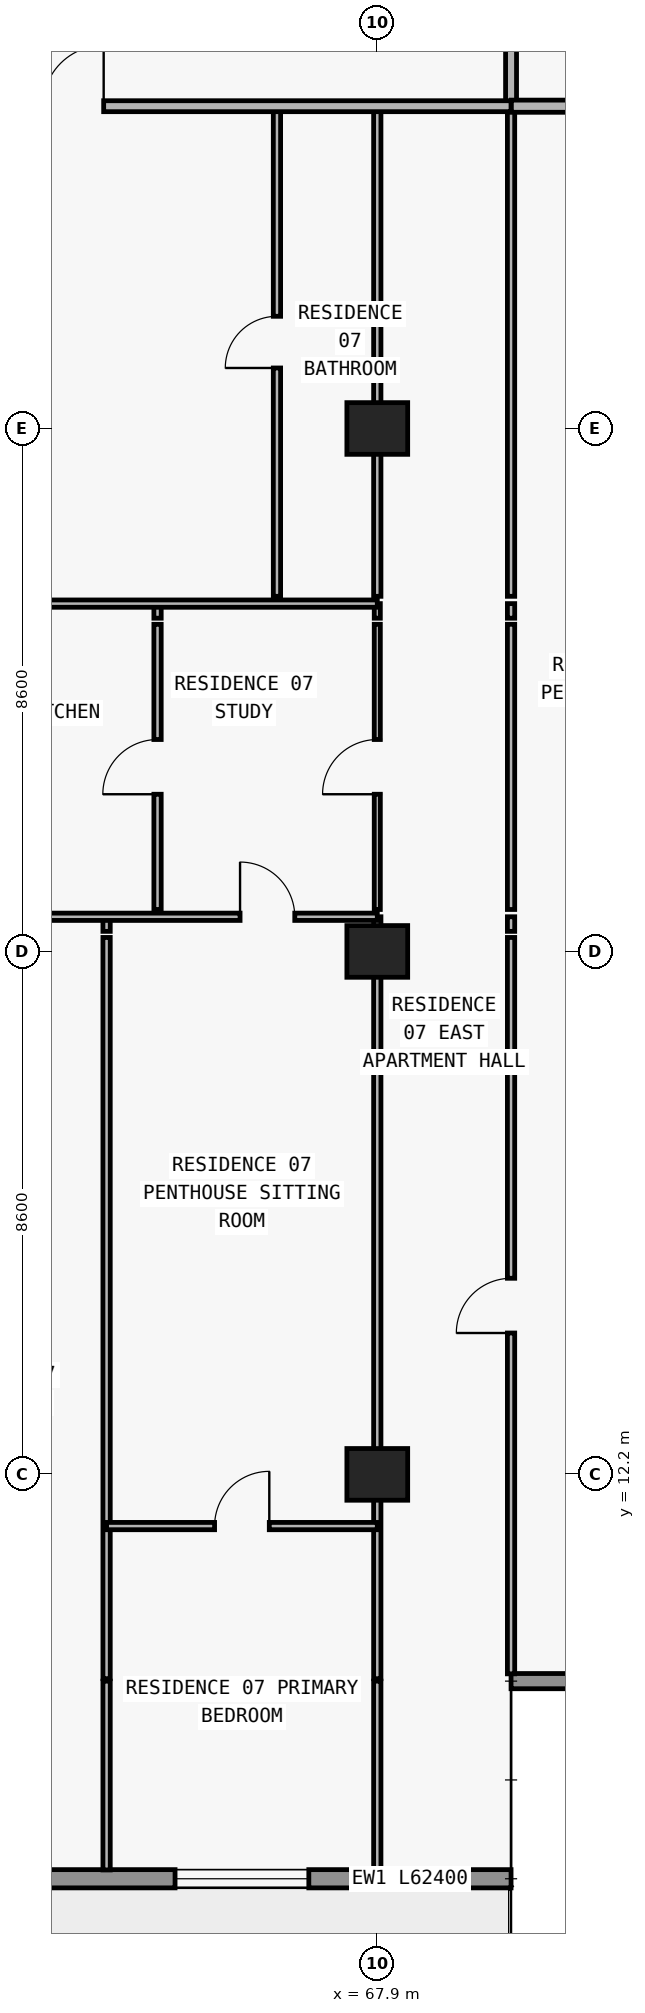
"""IFC4 building model, lengths in metres.
Left out: names, types, materials, properties, quantities, classifications, styles, units other than length and angle.
Written with IfcOpenShell. Run it as: python <this file> out.ifc"""

import sys

from ifc_helpers import new_model, si_unit, direction, frame, frame_2d, origin, origin_2d, place, context, subcontext, project, spatial, rectangle, extrude, element, fill, save


model = new_model("IFC4")
c1 = context("Model", 3, precision=1e-05, world=origin(), true_north=direction((0.0, 1.0)))
c2 = subcontext(c1, "Body", "Model", "MODEL_VIEW")
j1 = project(units=[si_unit("LENGTHUNIT", "METRE"), si_unit("PLANEANGLEUNIT", "RADIAN")], contexts=[c1])
p1 = place(None, origin())
s1 = spatial("IfcSite", under=j1, at=p1, CompositionType="ELEMENT")
p2 = place(p1, origin())
s2 = spatial("IfcBuilding", under=s1, at=p2, CompositionType="ELEMENT")
p3 = place(p2, frame((0.0, 0.0, 122.4)))
s3 = spatial("IfcBuildingStorey", under=s2, at=p3, CompositionType="ELEMENT", Elevation=122.4)
for number, where, z_axis, x_axis in (
    (1, (67.9, 12.2, 0.0), (0.0, 0.0, 1.0), (1.0, 0.0, 0.0)),
    (2, (67.9, 20.8, 0.0), (0.0, 0.0, 1.0), (1.0, 0.0, 0.0)),
    (3, (67.9, 29.4, 0.0), (0.0, 0.0, 1.0), (1.0, 0.0, 0.0)),
):
    element("IfcColumn", number, at=place(p3, frame(where, z_axis=z_axis, x_axis=x_axis)), inside=s3, PredefinedType="COLUMN", context=c2, shape_type="SweptSolid", body=[
        extrude(rectangle(XDim=1.0, YDim=0.85, at=origin_2d()), origin(), (0.0, 0.0, 1.0), 3.05),
    ])
p4 = place(p3, frame((70.1, 5.55, 0.0), z_axis=(0.0, 0.0, 1.0), x_axis=(-1.0, 0.0, 0.0)))
e4 = element("IfcWall", 4, at=p4, inside=s3, PredefinedType="STANDARD", context=c2, shape_type="SweptSolid", body=[
    extrude(rectangle(XDim=62.4, YDim=0.3, at=frame_2d((31.2, 0.0))), origin(), (0.0, 0.0, 1.0), 3.05),
])
p5 = place(p4, frame((57.226, 0.0, 0.0)))
e5 = element("IfcOpeningElement", 5, at=p5, cuts=e4, PredefinedType="OPENING", context=c2, shape_type="SweptSolid", body=[
    extrude(rectangle(XDim=2.0, YDim=2.3, at=frame_2d((1.0, 1.15))), frame((0.0, 0.16, 0.0), z_axis=(0.0, -1.0, 0.0), x_axis=(1.0, 0.0, 0.0)), (0.0, 0.0, 1.0), 0.32),
])
p6 = place(p4, frame((52.926, 0.0, 0.85)))
e6 = element("IfcOpeningElement", 6, at=p6, cuts=e4, PredefinedType="OPENING", context=c2, shape_type="SweptSolid", body=[
    extrude(rectangle(XDim=2.2, YDim=1.55, at=frame_2d((1.1, 0.775))), frame((0.0, 0.16, 0.0), z_axis=(0.0, -1.0, 0.0), x_axis=(1.0, 0.0, 0.0)), (0.0, 0.0, 1.0), 0.32),
])
p7 = place(p4, frame((48.49, 0.0, 0.0)))
e7 = element("IfcOpeningElement", 7, at=p7, cuts=e4, PredefinedType="OPENING", context=c2, shape_type="SweptSolid", body=[
    extrude(rectangle(XDim=2.0, YDim=2.3, at=frame_2d((1.0, 1.15))), frame((0.0, 0.16, 0.0), z_axis=(0.0, -1.0, 0.0), x_axis=(1.0, 0.0, 0.0)), (0.0, 0.0, 1.0), 0.32),
])
p8 = place(p4, frame((44.39, 0.0, 0.85)))
e8 = element("IfcOpeningElement", 8, at=p8, cuts=e4, PredefinedType="OPENING", context=c2, shape_type="SweptSolid", body=[
    extrude(rectangle(XDim=1.8, YDim=1.55, at=frame_2d((0.9, 0.775))), frame((0.0, 0.16, 0.0), z_axis=(0.0, -1.0, 0.0), x_axis=(1.0, 0.0, 0.0)), (0.0, 0.0, 1.0), 0.32),
])
p9 = place(p4, frame((40.426, 0.0, 0.0)))
e9 = element("IfcOpeningElement", 9, at=p9, cuts=e4, PredefinedType="OPENING", context=c2, shape_type="SweptSolid", body=[
    extrude(rectangle(XDim=2.0, YDim=2.3, at=frame_2d((1.0, 1.15))), frame((0.0, 0.16, 0.0), z_axis=(0.0, -1.0, 0.0), x_axis=(1.0, 0.0, 0.0)), (0.0, 0.0, 1.0), 0.32),
])
p10 = place(p4, frame((36.126, 0.0, 0.85)))
e10 = element("IfcOpeningElement", 10, at=p10, cuts=e4, PredefinedType="OPENING", context=c2, shape_type="SweptSolid", body=[
    extrude(rectangle(XDim=2.2, YDim=1.55, at=frame_2d((1.1, 0.775))), frame((0.0, 0.16, 0.0), z_axis=(0.0, -1.0, 0.0), x_axis=(1.0, 0.0, 0.0)), (0.0, 0.0, 1.0), 0.32),
])
p11 = place(p4, frame((31.91, 0.0, 0.0)))
e11 = element("IfcOpeningElement", 11, at=p11, cuts=e4, PredefinedType="OPENING", context=c2, shape_type="SweptSolid", body=[
    extrude(rectangle(XDim=2.0, YDim=2.3, at=frame_2d((1.0, 1.15))), frame((0.0, 0.16, 0.0), z_axis=(0.0, -1.0, 0.0), x_axis=(1.0, 0.0, 0.0)), (0.0, 0.0, 1.0), 0.32),
])
p12 = place(p4, frame((28.21, 0.0, 0.85)))
e12 = element("IfcOpeningElement", 12, at=p12, cuts=e4, PredefinedType="OPENING", context=c2, shape_type="SweptSolid", body=[
    extrude(rectangle(XDim=1.8, YDim=1.55, at=frame_2d((0.9, 0.775))), frame((0.0, 0.16, 0.0), z_axis=(0.0, -1.0, 0.0), x_axis=(1.0, 0.0, 0.0)), (0.0, 0.0, 1.0), 0.32),
])
p13 = place(p4, frame((24.426, 0.0, 0.0)))
e13 = element("IfcOpeningElement", 13, at=p13, cuts=e4, PredefinedType="OPENING", context=c2, shape_type="SweptSolid", body=[
    extrude(rectangle(XDim=2.0, YDim=2.3, at=frame_2d((1.0, 1.15))), frame((0.0, 0.16, 0.0), z_axis=(0.0, -1.0, 0.0), x_axis=(1.0, 0.0, 0.0)), (0.0, 0.0, 1.0), 0.32),
])
p14 = place(p4, frame((20.126, 0.0, 0.85)))
e14 = element("IfcOpeningElement", 14, at=p14, cuts=e4, PredefinedType="OPENING", context=c2, shape_type="SweptSolid", body=[
    extrude(rectangle(XDim=2.2, YDim=1.55, at=frame_2d((1.1, 0.775))), frame((0.0, 0.16, 0.0), z_axis=(0.0, -1.0, 0.0), x_axis=(1.0, 0.0, 0.0)), (0.0, 0.0, 1.0), 0.32),
])
p15 = place(p4, frame((15.69, 0.0, 0.0)))
e15 = element("IfcOpeningElement", 15, at=p15, cuts=e4, PredefinedType="OPENING", context=c2, shape_type="SweptSolid", body=[
    extrude(rectangle(XDim=2.0, YDim=2.3, at=frame_2d((1.0, 1.15))), frame((0.0, 0.16, 0.0), z_axis=(0.0, -1.0, 0.0), x_axis=(1.0, 0.0, 0.0)), (0.0, 0.0, 1.0), 0.32),
])
p16 = place(p4, frame((11.59, 0.0, 0.85)))
e16 = element("IfcOpeningElement", 16, at=p16, cuts=e4, PredefinedType="OPENING", context=c2, shape_type="SweptSolid", body=[
    extrude(rectangle(XDim=1.8, YDim=1.55, at=frame_2d((0.9, 0.775))), frame((0.0, 0.16, 0.0), z_axis=(0.0, -1.0, 0.0), x_axis=(1.0, 0.0, 0.0)), (0.0, 0.0, 1.0), 0.32),
])
p17 = place(p4, frame((7.626, 0.0, 0.0)))
e17 = element("IfcOpeningElement", 17, at=p17, cuts=e4, PredefinedType="OPENING", context=c2, shape_type="SweptSolid", body=[
    extrude(rectangle(XDim=2.0, YDim=2.3, at=frame_2d((1.0, 1.15))), frame((0.0, 0.16, 0.0), z_axis=(0.0, -1.0, 0.0), x_axis=(1.0, 0.0, 0.0)), (0.0, 0.0, 1.0), 0.32),
])
p18 = place(p4, frame((3.326, 0.0, 0.85)))
e18 = element("IfcOpeningElement", 18, at=p18, cuts=e4, PredefinedType="OPENING", context=c2, shape_type="SweptSolid", body=[
    extrude(rectangle(XDim=2.2, YDim=1.55, at=frame_2d((1.1, 0.775))), frame((0.0, 0.16, 0.0), z_axis=(0.0, -1.0, 0.0), x_axis=(1.0, 0.0, 0.0)), (0.0, 0.0, 1.0), 0.32),
])
p19 = place(p3, frame((70.1, 8.8, 0.0), z_axis=(0.0, 0.0, 1.0), x_axis=(1.0, 0.0, 0.0)))
e19 = element("IfcWall", 19, at=p19, inside=s3, PredefinedType="ELEMENTEDWALL", context=c2, shape_type="SweptSolid", body=[
    extrude(rectangle(XDim=3.65, YDim=0.25, at=frame_2d((1.825, 0.0))), origin(), (0.0, 0.0, 1.0), 3.05),
])
p20 = place(p3, frame((63.448, 5.695, 0.0), z_axis=(0.0, 0.0, 1.0), x_axis=(0.0, 1.0, 0.0)))
e20 = element("IfcWall", 20, at=p20, inside=s3, PredefinedType="PARTITIONING", context=c2, shape_type="SweptSolid", body=[
    extrude(rectangle(XDim=3.105, YDim=0.12, at=frame_2d((1.552, 0.0))), origin(), (0.0, 0.0, 1.0), 3.05),
])
p21 = place(p3, frame((63.448, 8.84, 0.0), z_axis=(0.0, 0.0, 1.0), x_axis=(0.0, 1.0, 0.0)))
e21 = element("IfcWall", 21, at=p21, inside=s3, PredefinedType="PARTITIONING", context=c2, shape_type="SweptSolid", body=[
    extrude(rectangle(XDim=12.19, YDim=0.12, at=frame_2d((6.095, 0.0))), origin(), (0.0, 0.0, 1.0), 3.05),
])
p22 = place(p3, frame((63.448, 21.13, 0.0), z_axis=(0.0, 0.0, 1.0), x_axis=(0.0, 1.0, 0.0)))
e22 = element("IfcWall", 22, at=p22, inside=s3, PredefinedType="PARTITIONING", context=c2, shape_type="SweptSolid", body=[
    extrude(rectangle(XDim=0.24, YDim=0.12, at=frame_2d((0.12, 0.0))), origin(), (0.0, 0.0, 1.0), 3.05),
])
p23 = place(p3, frame((64.286, 21.49, 0.0), z_axis=(0.0, 0.0, 1.0), x_axis=(0.0, 1.0, 0.0)))
e23 = element("IfcWall", 23, at=p23, inside=s3, PredefinedType="PARTITIONING", context=c2, shape_type="SweptSolid", body=[
    extrude(rectangle(XDim=4.69, YDim=0.12, at=frame_2d((2.345, 0.0))), origin(), (0.0, 0.0, 1.0), 3.05),
])
p24 = place(p23, frame((1.895, 0.0, 0.0)))
e24 = element("IfcOpeningElement", 24, at=p24, cuts=e23, PredefinedType="OPENING", context=c2, shape_type="SweptSolid", body=[
    extrude(rectangle(XDim=0.9, YDim=2.15, at=frame_2d((0.45, 1.075))), frame((0.0, 0.07, 0.0), z_axis=(0.0, -1.0, 0.0), x_axis=(1.0, 0.0, 0.0)), (0.0, 0.0, 1.0), 0.14),
])
p25 = place(p3, frame((64.286, 26.28, 0.0), z_axis=(0.0, 0.0, 1.0), x_axis=(0.0, 1.0, 0.0)))
e25 = element("IfcWall", 25, at=p25, inside=s3, PredefinedType="PARTITIONING", context=c2, shape_type="SweptSolid", body=[
    extrude(rectangle(XDim=0.24, YDim=0.12, at=frame_2d((0.12, 0.0))), origin(), (0.0, 0.0, 1.0), 3.05),
])
p26 = place(p3, frame((66.25, 26.64, 0.0), z_axis=(0.0, 0.0, 1.0), x_axis=(0.0, 1.0, 0.0)))
e26 = element("IfcWall", 26, at=p26, inside=s3, PredefinedType="PARTITIONING", context=c2, shape_type="SweptSolid", body=[
    extrude(rectangle(XDim=8.06, YDim=0.12, at=frame_2d((4.03, 0.0))), origin(), (0.0, 0.0, 1.0), 3.05),
])
p27 = place(p26, frame((3.755, 0.0, 0.0)))
e27 = element("IfcOpeningElement", 27, at=p27, cuts=e26, PredefinedType="OPENING", context=c2, shape_type="SweptSolid", body=[
    extrude(rectangle(XDim=0.85, YDim=2.1, at=frame_2d((0.425, 1.05))), frame((0.0, 0.07, 0.0), z_axis=(0.0, -1.0, 0.0), x_axis=(1.0, 0.0, 0.0)), (0.0, 0.0, 1.0), 0.14),
])
p28 = place(p3, frame((67.9, 5.695, 0.0), z_axis=(0.0, 0.0, 1.0), x_axis=(0.0, 1.0, 0.0)))
e28 = element("IfcWall", 28, at=p28, inside=s3, PredefinedType="PARTITIONING", context=c2, shape_type="SweptSolid", body=[
    extrude(rectangle(XDim=3.105, YDim=0.12, at=frame_2d((1.552, 0.0))), origin(), (0.0, 0.0, 1.0), 3.05),
])
p29 = place(p3, frame((67.9, 8.84, 0.0), z_axis=(0.0, 0.0, 1.0), x_axis=(0.0, 1.0, 0.0)))
e29 = element("IfcWall", 29, at=p29, inside=s3, PredefinedType="PARTITIONING", context=c2, shape_type="SweptSolid", body=[
    extrude(rectangle(XDim=12.19, YDim=0.12, at=frame_2d((6.095, 0.0))), origin(), (0.0, 0.0, 1.0), 2.174),
])
p30 = place(p3, frame((67.9, 21.13, 0.0), z_axis=(0.0, 0.0, 1.0), x_axis=(0.0, 1.0, 0.0)))
e30 = element("IfcWall", 30, at=p30, inside=s3, PredefinedType="PARTITIONING", context=c2, shape_type="SweptSolid", body=[
    extrude(rectangle(XDim=0.24, YDim=0.12, at=frame_2d((0.12, 0.0))), origin(), (0.0, 0.0, 1.0), 2.174),
])
p31 = place(p3, frame((67.9, 21.49, 0.0), z_axis=(0.0, 0.0, 1.0), x_axis=(0.0, 1.0, 0.0)))
e31 = element("IfcWall", 31, at=p31, inside=s3, PredefinedType="MOVABLE", context=c2, shape_type="SweptSolid", body=[
    extrude(rectangle(XDim=4.69, YDim=0.1, at=frame_2d((2.345, 0.0))), origin(), (0.0, 0.0, 1.0), 2.174),
])
p32 = place(p31, frame((1.895, 0.0, 0.0)))
e32 = element("IfcOpeningElement", 32, at=p32, cuts=e31, PredefinedType="OPENING", context=c2, shape_type="SweptSolid", body=[
    extrude(rectangle(XDim=0.9, YDim=2.124, at=frame_2d((0.45, 1.062))), frame((0.0, 0.06, 0.0), z_axis=(0.0, -1.0, 0.0), x_axis=(1.0, 0.0, 0.0)), (0.0, 0.0, 1.0), 0.12),
])
p33 = place(p3, frame((67.9, 26.28, 0.0), z_axis=(0.0, 0.0, 1.0), x_axis=(0.0, 1.0, 0.0)))
e33 = element("IfcWall", 33, at=p33, inside=s3, PredefinedType="MOVABLE", context=c2, shape_type="SweptSolid", body=[
    extrude(rectangle(XDim=0.24, YDim=0.1, at=frame_2d((0.12, 0.0))), origin(), (0.0, 0.0, 1.0), 2.174),
])
p34 = place(p3, frame((67.9, 26.64, 0.0), z_axis=(0.0, 0.0, 1.0), x_axis=(0.0, 1.0, 0.0)))
e34 = element("IfcWall", 34, at=p34, inside=s3, PredefinedType="PARTITIONING", context=c2, shape_type="SweptSolid", body=[
    extrude(rectangle(XDim=8.06, YDim=0.12, at=frame_2d((4.03, 0.0))), origin(), (0.0, 0.0, 1.0), 2.174),
])
p35 = place(p3, frame((70.1, 8.92, 0.0), z_axis=(0.0, 0.0, 1.0), x_axis=(0.0, 1.0, 0.0)))
e35 = element("IfcWall", 35, at=p35, inside=s3, PredefinedType="PARTITIONING", context=c2, shape_type="SweptSolid", body=[
    extrude(rectangle(XDim=12.11, YDim=0.12, at=frame_2d((6.055, 0.0))), origin(), (0.0, 0.0, 1.0), 3.05),
])
p36 = place(p35, frame((5.605, 0.0, 0.0)))
e36 = element("IfcOpeningElement", 36, at=p36, cuts=e35, PredefinedType="OPENING", context=c2, shape_type="SweptSolid", body=[
    extrude(rectangle(XDim=0.9, YDim=2.15, at=frame_2d((0.45, 1.075))), frame((0.0, 0.07, 0.0), z_axis=(0.0, -1.0, 0.0), x_axis=(1.0, 0.0, 0.0)), (0.0, 0.0, 1.0), 0.14),
])
p37 = place(p3, frame((70.1, 21.13, 0.0), z_axis=(0.0, 0.0, 1.0), x_axis=(0.0, 1.0, 0.0)))
e37 = element("IfcWall", 37, at=p37, inside=s3, PredefinedType="PARTITIONING", context=c2, shape_type="SweptSolid", body=[
    extrude(rectangle(XDim=0.24, YDim=0.12, at=frame_2d((0.12, 0.0))), origin(), (0.0, 0.0, 1.0), 3.05),
])
p38 = place(p3, frame((70.1, 21.49, 0.0), z_axis=(0.0, 0.0, 1.0), x_axis=(0.0, 1.0, 0.0)))
e38 = element("IfcWall", 38, at=p38, inside=s3, PredefinedType="PARTITIONING", context=c2, shape_type="SweptSolid", body=[
    extrude(rectangle(XDim=4.69, YDim=0.12, at=frame_2d((2.345, 0.0))), origin(), (0.0, 0.0, 1.0), 3.05),
])
p39 = place(p3, frame((70.1, 26.28, 0.0), z_axis=(0.0, 0.0, 1.0), x_axis=(0.0, 1.0, 0.0)))
e39 = element("IfcWall", 39, at=p39, inside=s3, PredefinedType="PARTITIONING", context=c2, shape_type="SweptSolid", body=[
    extrude(rectangle(XDim=0.24, YDim=0.12, at=frame_2d((0.12, 0.0))), origin(), (0.0, 0.0, 1.0), 3.05),
])
p40 = place(p3, frame((70.1, 26.64, 0.0), z_axis=(0.0, 0.0, 1.0), x_axis=(0.0, 1.0, 0.0)))
e40 = element("IfcWall", 40, at=p40, inside=s3, PredefinedType="PARTITIONING", context=c2, shape_type="SweptSolid", body=[
    extrude(rectangle(XDim=8.06, YDim=0.12, at=frame_2d((4.03, 0.0))), origin(), (0.0, 0.0, 1.0), 3.05),
])
p41 = place(p3, frame((70.1, 34.705, 0.0), z_axis=(0.0, 0.0, 1.0), x_axis=(0.0, 1.0, 0.0)))
e41 = element("IfcWall", 41, at=p41, inside=s3, PredefinedType="PARTITIONING", context=c2, shape_type="SweptSolid", body=[
    extrude(rectangle(XDim=2.245, YDim=0.18, at=frame_2d((1.123, 0.0))), origin(), (0.0, 0.0, 1.0), 3.05),
])
p42 = place(p3, frame((63.448, 11.35, 0.0), z_axis=(0.0, 0.0, 1.0), x_axis=(1.0, 0.0, 0.0)))
e42 = element("IfcWall", 42, at=p42, inside=s3, PredefinedType="PARTITIONING", context=c2, shape_type="SweptSolid", body=[
    extrude(rectangle(XDim=4.452, YDim=0.12, at=frame_2d((2.226, 0.0))), origin(), (0.0, 0.0, 1.0), 3.05),
])
p43 = place(p42, frame((1.776, 0.0, 0.0)))
e43 = element("IfcOpeningElement", 43, at=p43, cuts=e42, PredefinedType="OPENING", context=c2, shape_type="SweptSolid", body=[
    extrude(rectangle(XDim=0.9, YDim=2.15, at=frame_2d((0.45, 1.075))), frame((0.0, 0.07, 0.0), z_axis=(0.0, -1.0, 0.0), x_axis=(1.0, 0.0, 0.0)), (0.0, 0.0, 1.0), 0.14),
])
p44 = place(p3, frame((59.55, 21.37, 0.0), z_axis=(0.0, 0.0, 1.0), x_axis=(1.0, 0.0, 0.0)))
e44 = element("IfcWall", 44, at=p44, inside=s3, PredefinedType="PARTITIONING", context=c2, shape_type="SweptSolid", body=[
    extrude(rectangle(XDim=8.35, YDim=0.12, at=frame_2d((4.175, 0.0))), origin(), (0.0, 0.0, 1.0), 3.05),
])
p45 = place(p44, frame((1.499, 0.0, 0.0)))
e45 = element("IfcOpeningElement", 45, at=p45, cuts=e44, PredefinedType="OPENING", context=c2, shape_type="SweptSolid", body=[
    extrude(rectangle(XDim=0.9, YDim=2.15, at=frame_2d((0.45, 1.075))), frame((0.0, 0.07, 0.0), z_axis=(0.0, -1.0, 0.0), x_axis=(1.0, 0.0, 0.0)), (0.0, 0.0, 1.0), 0.14),
])
p46 = place(p44, frame((6.093, 0.0, 0.0)))
e46 = element("IfcOpeningElement", 46, at=p46, cuts=e44, PredefinedType="OPENING", context=c2, shape_type="SweptSolid", body=[
    extrude(rectangle(XDim=0.9, YDim=2.15, at=frame_2d((0.45, 1.075))), frame((0.0, 0.07, 0.0), z_axis=(0.0, -1.0, 0.0), x_axis=(1.0, 0.0, 0.0)), (0.0, 0.0, 1.0), 0.14),
])
p47 = place(p3, frame((59.55, 26.52, 0.0), z_axis=(0.0, 0.0, 1.0), x_axis=(1.0, 0.0, 0.0)))
e47 = element("IfcWall", 47, at=p47, inside=s3, PredefinedType="PARTITIONING", context=c2, shape_type="SweptSolid", body=[
    extrude(rectangle(XDim=8.35, YDim=0.12, at=frame_2d((4.175, 0.0))), origin(), (0.0, 0.0, 1.0), 3.05),
])
p48 = place(p47, frame((1.918, 0.0, 0.0)))
e48 = element("IfcOpeningElement", 48, at=p48, cuts=e47, PredefinedType="OPENING", context=c2, shape_type="SweptSolid", body=[
    extrude(rectangle(XDim=0.9, YDim=2.15, at=frame_2d((0.45, 1.075))), frame((0.0, 0.07, 0.0), z_axis=(0.0, -1.0, 0.0), x_axis=(1.0, 0.0, 0.0)), (0.0, 0.0, 1.0), 0.14),
])
p49 = place(p3, frame((59.55, 34.7, 0.0), z_axis=(0.0, 0.0, 1.0), x_axis=(1.0, 0.0, 0.0)))
e49 = element("IfcWall", 49, at=p49, inside=s3, PredefinedType="PARTITIONING", context=c2, shape_type="SweptSolid", body=[
    extrude(rectangle(XDim=10.55, YDim=0.18, at=frame_2d((5.275, 0.0))), origin(), (0.0, 0.0, 1.0), 3.05),
])
p50 = place(p49, frame((2.85, 0.0, 0.0)))
e50 = element("IfcOpeningElement", 50, at=p50, cuts=e49, PredefinedType="OPENING", context=c2, shape_type="SweptSolid", body=[
    extrude(rectangle(XDim=1.0, YDim=2.2, at=frame_2d((0.5, 1.1))), frame((0.0, 0.1, 0.0), z_axis=(0.0, -1.0, 0.0), x_axis=(1.0, 0.0, 0.0)), (0.0, 0.0, 1.0), 0.2),
])
p51 = place(p3, frame((70.105, 34.7, 0.0), z_axis=(0.0, 0.0, 1.0), x_axis=(1.0, 0.0, 0.0)))
e51 = element("IfcWall", 51, at=p51, inside=s3, PredefinedType="PARTITIONING", context=c2, shape_type="SweptSolid", body=[
    extrude(rectangle(XDim=3.5, YDim=0.2, at=frame_2d((1.75, 0.0))), origin(), (0.0, 0.0, 1.0), 3.05),
])
p52 = place(p18, origin())
e52 = element("IfcWindow", 52, at=p52, inside=s3, PartitioningType="SINGLE_PANEL", PredefinedType="WINDOW", context=c2, shape_type="SweptSolid", body=[
    extrude(rectangle(XDim=2.2, YDim=1.55, at=frame_2d((1.1, 0.775))), frame((0.0, 0.03, 0.0), z_axis=(0.0, -1.0, 0.0), x_axis=(1.0, 0.0, 0.0)), (0.0, 0.0, 1.0), 0.06),
])
fill(e18, e52)
p53 = place(p50, origin())
e53 = element("IfcDoor", 53, at=p53, inside=s3, OperationType="SINGLE_SWING_RIGHT", PredefinedType="DOOR", context=c2, shape_type="SweptSolid", body=[
    extrude(rectangle(XDim=1.0, YDim=2.2, at=frame_2d((0.5, 1.1))), frame((0.0, 0.025, 0.0), z_axis=(0.0, -1.0, 0.0), x_axis=(1.0, 0.0, 0.0)), (0.0, 0.0, 1.0), 0.05),
])
fill(e50, e53)
p54 = place(p27, origin())
e54 = element("IfcDoor", 54, at=p54, inside=s3, OperationType="SINGLE_SWING_LEFT", PredefinedType="DOOR", context=c2, shape_type="SweptSolid", body=[
    extrude(rectangle(XDim=0.85, YDim=2.1, at=frame_2d((0.425, 1.05))), frame((0.0, 0.025, 0.0), z_axis=(0.0, -1.0, 0.0), x_axis=(1.0, 0.0, 0.0)), (0.0, 0.0, 1.0), 0.05),
])
fill(e27, e54)
p55 = place(p24, origin())
e55 = element("IfcDoor", 55, at=p55, inside=s3, OperationType="SINGLE_SWING_LEFT", PredefinedType="DOOR", context=c2, shape_type="SweptSolid", body=[
    extrude(rectangle(XDim=0.9, YDim=2.15, at=frame_2d((0.45, 1.075))), frame((0.0, 0.025, 0.0), z_axis=(0.0, -1.0, 0.0), x_axis=(1.0, 0.0, 0.0)), (0.0, 0.0, 1.0), 0.05),
])
fill(e24, e55)
p56 = place(p46, origin())
e56 = element("IfcDoor", 56, at=p56, inside=s3, OperationType="SINGLE_SWING_LEFT", PredefinedType="DOOR", context=c2, shape_type="SweptSolid", body=[
    extrude(rectangle(XDim=0.9, YDim=2.15, at=frame_2d((0.45, 1.075))), frame((0.0, 0.025, 0.0), z_axis=(0.0, -1.0, 0.0), x_axis=(1.0, 0.0, 0.0)), (0.0, 0.0, 1.0), 0.05),
])
fill(e46, e56)
p57 = place(p43, origin())
e57 = element("IfcDoor", 57, at=p57, inside=s3, OperationType="SINGLE_SWING_RIGHT", PredefinedType="DOOR", context=c2, shape_type="SweptSolid", body=[
    extrude(rectangle(XDim=0.9, YDim=2.15, at=frame_2d((0.45, 1.075))), frame((0.0, 0.025, 0.0), z_axis=(0.0, -1.0, 0.0), x_axis=(1.0, 0.0, 0.0)), (0.0, 0.0, 1.0), 0.05),
])
fill(e43, e57)
p58 = place(p32, origin())
e58 = element("IfcDoor", 58, at=p58, inside=s3, OperationType="SINGLE_SWING_LEFT", PredefinedType="DOOR", context=c2, shape_type="SweptSolid", body=[
    extrude(rectangle(XDim=0.9, YDim=2.124, at=frame_2d((0.45, 1.062))), frame((0.0, 0.025, 0.0), z_axis=(0.0, -1.0, 0.0), x_axis=(1.0, 0.0, 0.0)), (0.0, 0.0, 1.0), 0.05),
])
fill(e32, e58)
p59 = place(p36, origin())
e59 = element("IfcDoor", 59, at=p59, inside=s3, OperationType="SINGLE_SWING_LEFT", PredefinedType="DOOR", context=c2, shape_type="SweptSolid", body=[
    extrude(rectangle(XDim=0.9, YDim=2.15, at=frame_2d((0.45, 1.075))), frame((0.0, 0.025, 0.0), z_axis=(0.0, -1.0, 0.0), x_axis=(1.0, 0.0, 0.0)), (0.0, 0.0, 1.0), 0.05),
])
fill(e36, e59)
save(model, sys.argv[1])
